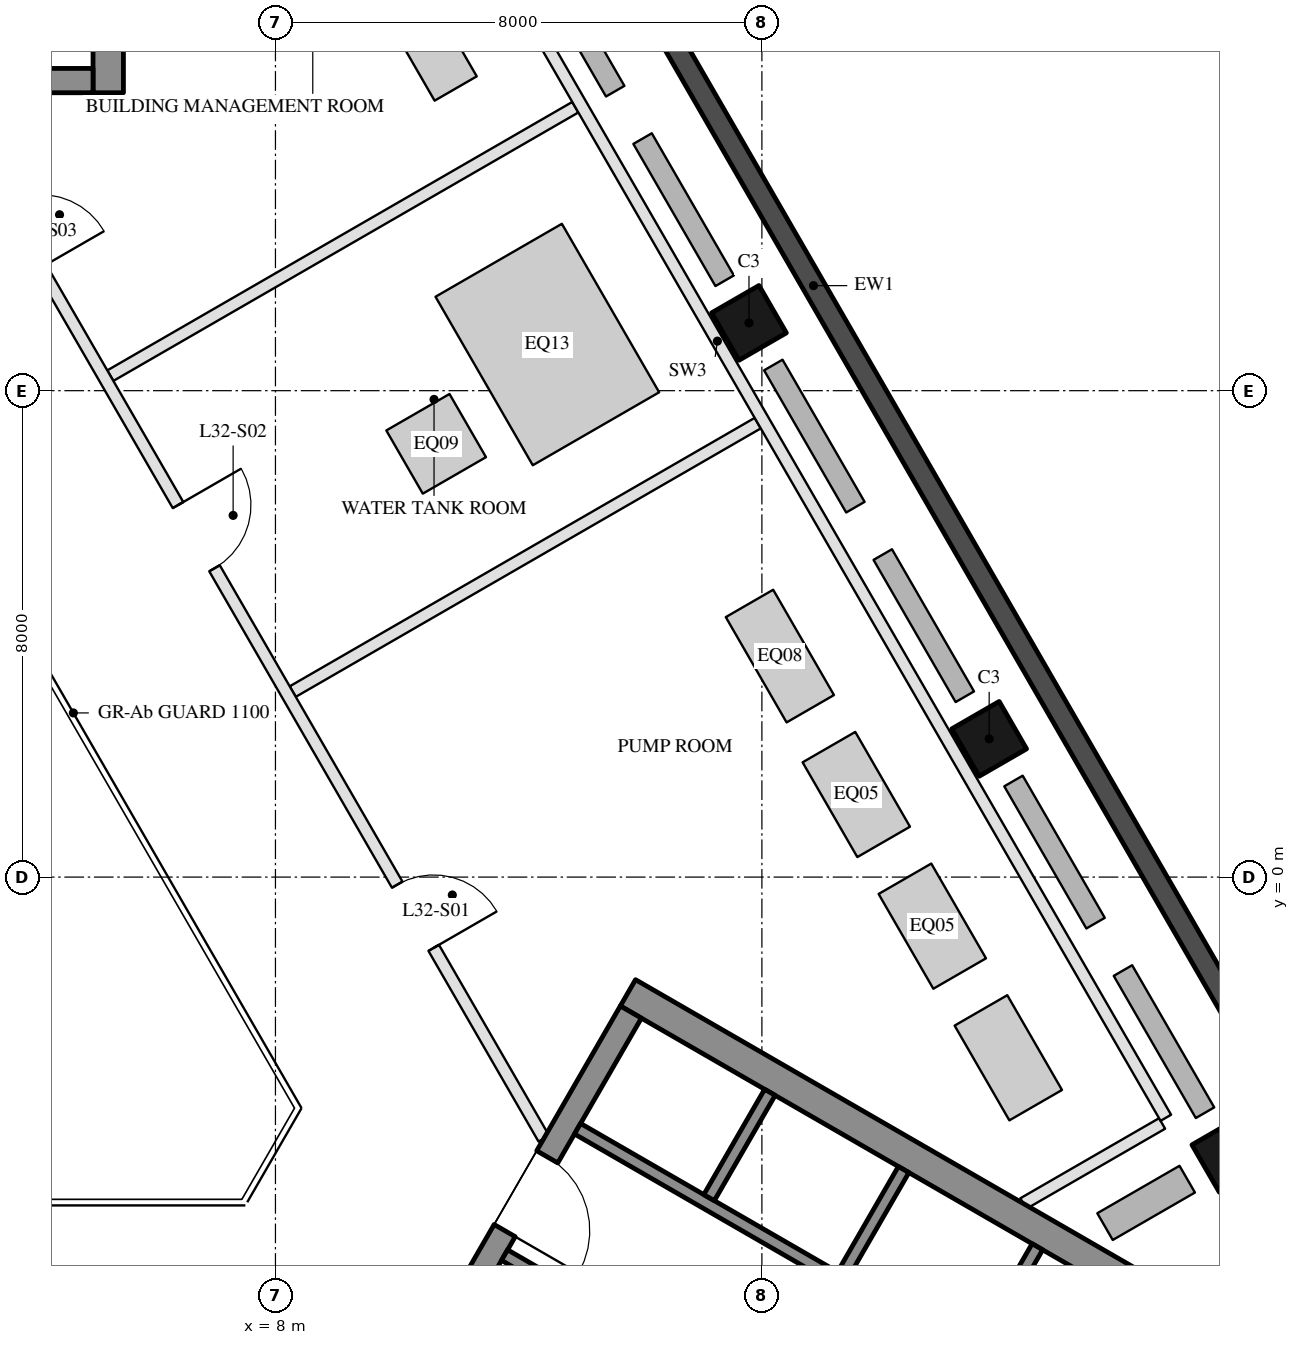
"""IFC4 building model, lengths in metres.
Left out: names, types, materials, properties, quantities, classifications, styles, units other than length and angle.
Written with IfcOpenShell. Run it as: python <this file> out.ifc"""

import sys

from ifc_helpers import new_model, si_unit, direction, frame, frame_2d, origin, origin_2d, place, context, subcontext, project, spatial, rectangle, hollow_rectangle, extrude, element, fill, save


model = new_model("IFC4")
c1 = context("Model", 3, precision=1e-05, world=origin(), true_north=direction((0.0, 1.0)))
c2 = subcontext(c1, "Body", "Model", "MODEL_VIEW")
j1 = project(units=[si_unit("LENGTHUNIT", "METRE"), si_unit("PLANEANGLEUNIT", "RADIAN")], contexts=[c1])
p1 = place(None, origin())
s1 = spatial("IfcSite", under=j1, at=p1, CompositionType="ELEMENT")
p2 = place(p1, origin())
s2 = spatial("IfcBuilding", under=s1, at=p2, CompositionType="ELEMENT")
p3 = place(p2, frame((0.0, 0.0, 137.6)))
s3 = spatial("IfcBuildingStorey", under=s2, at=p3, CompositionType="ELEMENT", Elevation=137.6)
for number, where, z_axis, x_axis in (
    (1, (23.688, -4.568, 0.0), (0.0, 0.0, 1.0), (-0.5, 0.866, 0.0)),
    (2, (19.738, 2.273, 0.0), (0.0, 0.0, 1.0), (-0.5, 0.866, 0.0)),
    (3, (15.788, 9.115, 0.0), (0.0, 0.0, 1.0), (-0.5, 0.866, 0.0)),
):
    element("IfcColumn", number, at=place(p3, frame(where, z_axis=z_axis, x_axis=x_axis)), inside=s3, PredefinedType="COLUMN", context=c2, shape_type="SweptSolid", body=[
        extrude(hollow_rectangle(XDim=0.9, YDim=0.9, WallThickness=0.04, at=origin_2d()), origin(), (0.0, 0.0, 1.0), 4.5),
    ])
p4 = place(p3, frame((26.256, -6.567, 0.0), z_axis=(0.0, 0.0, 1.0), x_axis=(-0.499998380999, 0.866026338513, 0.0)))
e4 = element("IfcWall", 4, at=p4, inside=s3, PredefinedType="SOLIDWALL", context=c2, shape_type="SweptSolid", body=[
    extrude(rectangle(XDim=37.631, YDim=0.35, at=frame_2d((18.816, 0.0))), origin(), (0.0, 0.0, 1.0), 4.2),
])
p5 = place(p3, frame((5.25, 12.9, 0.0), z_axis=(0.0, 0.0, 1.0), x_axis=(0.0, 1.0, 0.0)))
e5 = element("IfcWall", 5, at=p5, inside=s3, PredefinedType="SHEAR", context=c2, shape_type="SweptSolid", body=[
    extrude(rectangle(XDim=14.837, YDim=0.5, at=frame_2d((7.418, 0.0))), origin(), (0.0, 0.0, 1.0), 4.2),
])
p6 = place(p3, frame((5.0, 13.1, 0.0), z_axis=(0.0, 0.0, 1.0), x_axis=(-1.0, 0.0, 0.0)))
e6 = element("IfcWall", 6, at=p6, inside=s3, PredefinedType="SHEAR", context=c2, shape_type="SweptSolid", body=[
    extrude(rectangle(XDim=10.0, YDim=0.4, at=frame_2d((5.0, 0.0))), origin(), (0.0, 0.0, 1.0), 4.2),
])
p7 = place(p6, frame((3.55, 0.0, 0.0)))
e7 = element("IfcOpeningElement", 7, at=p7, cuts=e6, PredefinedType="OPENING", context=c2, shape_type="SweptSolid", body=[
    extrude(rectangle(XDim=1.1, YDim=2.1, at=frame_2d((0.55, 1.05))), frame((0.0, 0.21, 0.0), z_axis=(0.0, -1.0, 0.0), x_axis=(1.0, 0.0, 0.0)), (0.0, 0.0, 1.0), 0.42),
])
p8 = place(p6, frame((5.85, 0.0, 0.0)))
e8 = element("IfcOpeningElement", 8, at=p8, cuts=e6, PredefinedType="OPENING", context=c2, shape_type="SweptSolid", body=[
    extrude(rectangle(XDim=1.4, YDim=2.1, at=frame_2d((0.7, 1.05))), frame((0.0, 0.21, 0.0), z_axis=(0.0, -1.0, 0.0), x_axis=(1.0, 0.0, 0.0)), (0.0, 0.0, 1.0), 0.42),
])
p9 = place(p3, frame((13.797, -1.903, 0.0), z_axis=(0.0, 0.0, 1.0), x_axis=(0.866025009528, -0.500000682871, 0.0)))
e9 = element("IfcWall", 9, at=p9, inside=s3, PredefinedType="SHEAR", context=c2, shape_type="SweptSolid", body=[
    extrude(rectangle(XDim=14.837, YDim=0.5, at=frame_2d((7.418, 0.0))), origin(), (0.0, 0.0, 1.0), 4.2),
])
p10 = place(p3, frame((8.845, -10.88, 0.0), z_axis=(0.0, 0.0, 1.0), x_axis=(0.500004234368, 0.866022959057, 0.0)))
e10 = element("IfcWall", 10, at=p10, inside=s3, PredefinedType="SHEAR", context=c2, shape_type="SweptSolid", body=[
    extrude(rectangle(XDim=10.0, YDim=0.4, at=frame_2d((5.0, 0.0))), origin(), (0.0, 0.0, 1.0), 4.2),
])
p11 = place(p10, frame((3.55, 0.0, 0.0)))
e11 = element("IfcOpeningElement", 11, at=p11, cuts=e10, PredefinedType="OPENING", context=c2, shape_type="SweptSolid", body=[
    extrude(rectangle(XDim=1.1, YDim=2.1, at=frame_2d((0.55, 1.05))), frame((0.0, 0.21, 0.0), z_axis=(0.0, -1.0, 0.0), x_axis=(1.0, 0.0, 0.0)), (0.0, 0.0, 1.0), 0.42),
])
p12 = place(p10, frame((5.85, 0.0, 0.0)))
e12 = element("IfcOpeningElement", 12, at=p12, cuts=e10, PredefinedType="OPENING", context=c2, shape_type="SweptSolid", body=[
    extrude(rectangle(XDim=1.4, YDim=2.1, at=frame_2d((0.7, 1.05))), frame((0.0, 0.21, 0.0), z_axis=(0.0, -1.0, 0.0), x_axis=(1.0, 0.0, 0.0)), (0.0, 0.0, 1.0), 0.42),
])
p13 = place(p3, frame((11.768, -6.217, 0.0), z_axis=(0.0, 0.0, 1.0), x_axis=(0.866050077142, -0.499957262057, 0.0)))
e13 = element("IfcWall", 13, at=p13, inside=s3, PredefinedType="SHEAR", context=c2, shape_type="SweptSolid", body=[
    extrude(rectangle(XDim=2.4, YDim=0.2, at=frame_2d((1.2, 0.0))), origin(), (0.0, 0.0, 1.0), 4.2),
])
p14 = place(p3, frame((12.968, -4.138, 0.0), z_axis=(0.0, 0.0, 1.0), x_axis=(0.866028328073, -0.49999493495, 0.0)))
e14 = element("IfcWall", 14, at=p14, inside=s3, PredefinedType="SHEAR", context=c2, shape_type="SweptSolid", body=[
    extrude(rectangle(XDim=10.16, YDim=0.2, at=frame_2d((5.08, 0.0))), origin(), (0.0, 0.0, 1.0), 4.2),
])
for number, where, z_axis, x_axis in (
    (15, (15.131, -5.272, 0.0), (0.0, 0.0, 1.0), (0.5, 0.866, 0.0)),
    (16, (17.331, -6.542, 0.0), (0.0, 0.0, 1.0), (0.5, 0.866, 0.0)),
    (17, (19.531, -7.812, 0.0), (0.0, 0.0, 1.0), (0.5, 0.866, 0.0)),
):
    element("IfcWall", number, at=place(p3, frame(where, z_axis=z_axis, x_axis=x_axis)), inside=s3, PredefinedType="SHEAR", context=c2, shape_type="SweptSolid", body=[
        extrude(rectangle(XDim=2.0, YDim=0.2, at=frame_2d((1.0, 0.0))), origin(), (0.0, 0.0, 1.0), 4.2),
    ])
p15 = place(p3, frame((22.581, -4.052, 0.0), z_axis=(0.0, 0.0, 1.0), x_axis=(-0.866038977738, -0.499976488486, 0.0)))
e18 = element("IfcWall", 18, at=p15, inside=s3, PredefinedType="PARTITIONING", context=c2, shape_type="SweptSolid", body=[
    extrude(rectangle(XDim=2.635, YDim=0.2, at=frame_2d((1.317, 0.0))), origin(), (0.0, 0.0, 1.0), 4.2),
])
for number, where, z_axis, x_axis in (
    (19, (15.931, 7.466, 0.0), (0.0, 0.0, 1.0), (-0.866, -0.5, 0.0)),
    (20, (12.931, 12.662, 0.0), (0.0, 0.0, 1.0), (-0.866, -0.5, 0.0)),
):
    element("IfcWall", number, at=place(p3, frame(where, z_axis=z_axis, x_axis=x_axis)), inside=s3, PredefinedType="PARTITIONING", context=c2, shape_type="SweptSolid", body=[
        extrude(rectangle(XDim=8.83, YDim=0.2, at=frame_2d((4.415, 0.0))), origin(), (0.0, 0.0, 1.0), 4.2),
    ])
p16 = place(p3, frame((22.643, -3.959, 0.0), z_axis=(0.0, 0.0, 1.0), x_axis=(-0.499998500593, 0.866026269466, 0.0)))
e21 = element("IfcWall", 21, at=p16, inside=s3, PredefinedType="PARTITIONING", context=c2, shape_type="SweptSolid", body=[
    extrude(rectangle(XDim=29.5, YDim=0.2, at=frame_2d((14.75, 0.0))), origin(), (0.0, 0.0, 1.0), 3.41),
])
p17 = place(p3, frame((12.413, -4.3, 0.0), z_axis=(0.0, 0.0, 1.0), x_axis=(-0.50000478328, 0.866022642139, 0.0)))
e22 = element("IfcWall", 22, at=p17, inside=s3, PredefinedType="PARTITIONING", context=c2, shape_type="SweptSolid", body=[
    extrude(rectangle(XDim=19.861, YDim=0.2, at=frame_2d((9.931, 0.0))), origin(), (0.0, 0.0, 1.0), 3.41),
])
p18 = place(p17, frame((3.621, 0.0, 0.0)))
e23 = element("IfcOpeningElement", 23, at=p18, cuts=e22, PredefinedType="OPENING", context=c2, shape_type="SweptSolid", body=[
    extrude(rectangle(XDim=1.2, YDim=2.1, at=frame_2d((0.6, 1.05))), frame((0.0, 0.11, 0.0), z_axis=(0.0, -1.0, 0.0), x_axis=(1.0, 0.0, 0.0)), (0.0, 0.0, 1.0), 0.22),
])
p19 = place(p17, frame((10.831, 0.0, 0.0)))
e24 = element("IfcOpeningElement", 24, at=p19, cuts=e22, PredefinedType="OPENING", context=c2, shape_type="SweptSolid", body=[
    extrude(rectangle(XDim=1.2, YDim=2.1, at=frame_2d((0.6, 1.05))), frame((0.0, 0.11, 0.0), z_axis=(0.0, -1.0, 0.0), x_axis=(1.0, 0.0, 0.0)), (0.0, 0.0, 1.0), 0.22),
])
p20 = place(p17, frame((16.54, 0.0, 0.0)))
e25 = element("IfcOpeningElement", 25, at=p20, cuts=e22, PredefinedType="OPENING", context=c2, shape_type="SweptSolid", body=[
    extrude(rectangle(XDim=1.2, YDim=2.1, at=frame_2d((0.6, 1.05))), frame((0.0, 0.11, 0.0), z_axis=(0.0, -1.0, 0.0), x_axis=(1.0, 0.0, 0.0)), (0.0, 0.0, 1.0), 0.22),
])
p21 = place(p12, frame((1.4, 0.0, 0.0), z_axis=(0.0, 0.0, 1.0), x_axis=(-1.0, 0.0, 0.0)))
e26 = element("IfcDoor", 26, at=p21, inside=s3, OperationType="DOUBLE_DOOR_SINGLE_SWING", PredefinedType="DOOR", context=c2, shape_type="SweptSolid", body=[
    extrude(rectangle(XDim=1.4, YDim=2.1, at=frame_2d((0.7, 1.05))), frame((0.0, 0.025, 0.0), z_axis=(0.0, -1.0, 0.0), x_axis=(1.0, 0.0, 0.0)), (0.0, 0.0, 1.0), 0.05),
])
fill(e12, e26)
p22 = place(p18, frame((1.2, 0.0, 0.0), z_axis=(0.0, 0.0, 1.0), x_axis=(-1.0, 0.0, 0.0)))
e27 = element("IfcDoor", 27, at=p22, inside=s3, OperationType="SINGLE_SWING_RIGHT", PredefinedType="DOOR", context=c2, shape_type="SweptSolid", body=[
    extrude(rectangle(XDim=1.2, YDim=2.1, at=frame_2d((0.6, 1.05))), frame((0.0, 0.025, 0.0), z_axis=(0.0, -1.0, 0.0), x_axis=(1.0, 0.0, 0.0)), (0.0, 0.0, 1.0), 0.05),
])
fill(e23, e27)
p23 = place(p19, frame((1.2, 0.0, 0.0), z_axis=(0.0, 0.0, 1.0), x_axis=(-1.0, 0.0, 0.0)))
e28 = element("IfcDoor", 28, at=p23, inside=s3, OperationType="SINGLE_SWING_LEFT", PredefinedType="DOOR", context=c2, shape_type="SweptSolid", body=[
    extrude(rectangle(XDim=1.2, YDim=2.1, at=frame_2d((0.6, 1.05))), frame((0.0, 0.025, 0.0), z_axis=(0.0, -1.0, 0.0), x_axis=(1.0, 0.0, 0.0)), (0.0, 0.0, 1.0), 0.05),
])
fill(e24, e28)
save(model, sys.argv[1])
